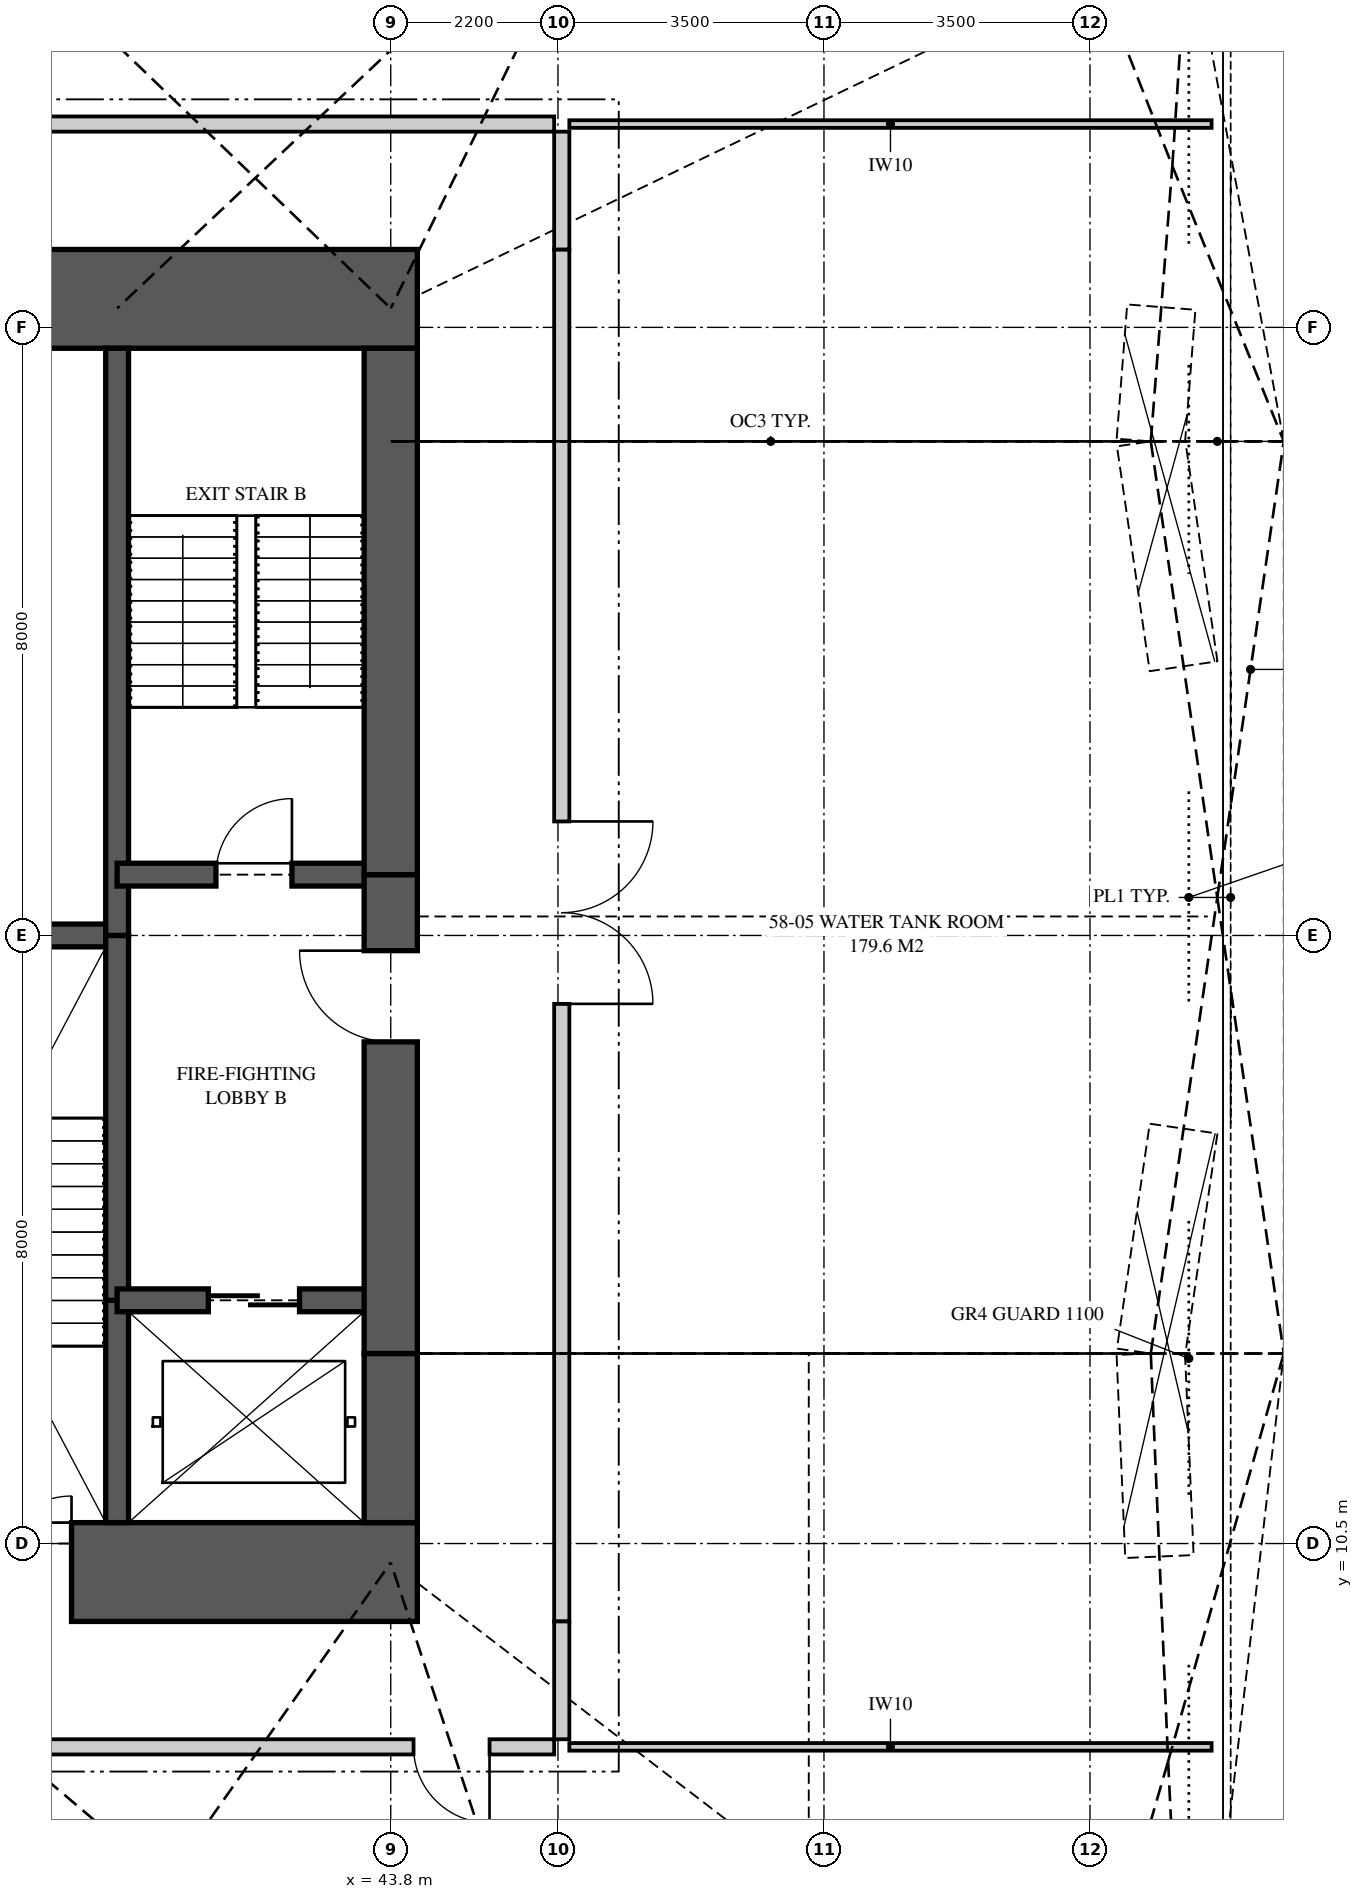
"""IFC4 building model, lengths in metres.
Left out: names, types, materials, properties, quantities, classifications, styles, units other than length and angle.
Written with IfcOpenShell. Run it as: python <this file> out.ifc"""

import sys

from ifc_helpers import new_model, si_unit, direction, frame, frame_2d, origin, place, context, subcontext, project, spatial, polyline, rectangle, outline, extrude, element, fill, save


model = new_model("IFC4")
c1 = context("Model", 3, precision=1e-05, world=origin(), true_north=direction((0.0, 1.0)))
c2 = subcontext(c1, "Body", "Model", "MODEL_VIEW")
j1 = project(units=[si_unit("LENGTHUNIT", "METRE"), si_unit("PLANEANGLEUNIT", "RADIAN")], contexts=[c1])
p1 = place(None, origin())
s1 = spatial("IfcSite", under=j1, at=p1, CompositionType="ELEMENT")
p2 = place(p1, origin())
s2 = spatial("IfcBuilding", under=s1, at=p2, CompositionType="ELEMENT")
p3 = place(p2, frame((0.0, 0.0, 212.95)))
s3 = spatial("IfcBuildingStorey", under=s2, at=p3, CompositionType="ELEMENT", Elevation=212.95)
p4 = place(p3, frame((35.9, 10.125, 0.0), z_axis=(0.0, 0.0, 1.0), x_axis=(1.0, 0.0, 0.0)))
e1 = element("IfcWall", 1, at=p4, inside=s3, PredefinedType="SHEAR", context=c2, shape_type="SweptSolid", body=[
    extrude(rectangle(XDim=8.25, YDim=1.3, at=frame_2d((4.125, 0.0))), origin(), (0.0, 0.0, 1.0), 5.0),
])
p5 = place(p4, frame((2.7, 0.0, 0.0)))
e2 = element("IfcOpeningElement", 2, at=p5, cuts=e1, PredefinedType="OPENING", context=c2, shape_type="SweptSolid", body=[
    extrude(rectangle(XDim=1.0, YDim=2.1, at=frame_2d((0.5, 1.05))), frame((0.0, 0.66, 0.0), z_axis=(0.0, -1.0, 0.0), x_axis=(1.0, 0.0, 0.0)), (0.0, 0.0, 1.0), 1.32),
])
p6 = place(p3, frame((44.15, 26.875, 0.0), z_axis=(0.0, 0.0, 1.0), x_axis=(-1.0, 0.0, 0.0)))
e3 = element("IfcWall", 3, at=p6, inside=s3, PredefinedType="SHEAR", context=c2, shape_type="SweptSolid", body=[
    extrude(rectangle(XDim=8.25, YDim=1.3, at=frame_2d((4.125, 0.0))), origin(), (0.0, 0.0, 1.0), 5.0),
])
p7 = place(p6, frame((5.65, 0.0, 0.0)))
e4 = element("IfcOpeningElement", 4, at=p7, cuts=e3, PredefinedType="OPENING", context=c2, shape_type="SweptSolid", body=[
    extrude(rectangle(XDim=0.9, YDim=2.1, at=frame_2d((0.45, 1.05))), frame((0.0, 0.66, 0.0), z_axis=(0.0, -1.0, 0.0), x_axis=(1.0, 0.0, 0.0)), (0.0, 0.0, 1.0), 1.32),
])
p8 = place(p3, frame((43.8, 10.775, 0.0), z_axis=(0.0, 0.0, 1.0), x_axis=(0.0, 1.0, 0.0)))
e5 = element("IfcWall", 5, at=p8, inside=s3, PredefinedType="SHEAR", context=c2, shape_type="SweptSolid", body=[
    extrude(rectangle(XDim=2.225, YDim=0.7, at=frame_2d((1.113, 0.0))), origin(), (0.0, 0.0, 1.0), 5.0),
])
p9 = place(p3, frame((43.8, 13.0, 0.0), z_axis=(0.0, 0.0, 1.0), x_axis=(0.0, 1.0, 0.0)))
e6 = element("IfcWall", 6, at=p9, inside=s3, PredefinedType="SHEAR", context=c2, shape_type="SweptSolid", body=[
    extrude(rectangle(XDim=6.3, YDim=0.7, at=frame_2d((3.15, 0.0))), origin(), (0.0, 0.0, 1.0), 5.0),
])
p10 = place(p9, frame((4.1, 0.0, 0.0)))
e7 = element("IfcOpeningElement", 7, at=p10, cuts=e6, PredefinedType="OPENING", context=c2, shape_type="SweptSolid", body=[
    extrude(rectangle(XDim=1.2, YDim=2.2, at=frame_2d((0.6, 1.1))), frame((0.0, 0.36, 0.0), z_axis=(0.0, -1.0, 0.0), x_axis=(1.0, 0.0, 0.0)), (0.0, 0.0, 1.0), 0.72),
])
p11 = place(p3, frame((43.8, 19.3, 0.0), z_axis=(0.0, 0.0, 1.0), x_axis=(0.0, 1.0, 0.0)))
e8 = element("IfcWall", 8, at=p11, inside=s3, PredefinedType="SHEAR", context=c2, shape_type="SweptSolid", body=[
    extrude(rectangle(XDim=6.925, YDim=0.7, at=frame_2d((3.462, 0.0))), origin(), (0.0, 0.0, 1.0), 5.0),
])
p12 = place(p3, frame((40.2, 10.775, 0.0), z_axis=(0.0, 0.0, 1.0), x_axis=(0.0, 1.0, 0.0)))
e9 = element("IfcWall", 9, at=p12, inside=s3, PredefinedType="SHEAR", context=c2, shape_type="SweptSolid", body=[
    extrude(rectangle(XDim=2.925, YDim=0.3, at=frame_2d((1.462, 0.0))), origin(), (0.0, 0.0, 1.0), 5.0),
])
p13 = place(p3, frame((40.2, 13.7, 0.0), z_axis=(0.0, 0.0, 1.0), x_axis=(0.0, 1.0, 0.0)))
e10 = element("IfcWall", 10, at=p13, inside=s3, PredefinedType="SHEAR", context=c2, shape_type="SweptSolid", body=[
    extrude(rectangle(XDim=4.8, YDim=0.3, at=frame_2d((2.4, 0.0))), origin(), (0.0, 0.0, 1.0), 5.0),
])
p14 = place(p3, frame((40.2, 18.5, 0.0), z_axis=(0.0, 0.0, 1.0), x_axis=(0.0, 1.0, 0.0)))
e11 = element("IfcWall", 11, at=p14, inside=s3, PredefinedType="SHEAR", context=c2, shape_type="SweptSolid", body=[
    extrude(rectangle(XDim=7.725, YDim=0.3, at=frame_2d((3.863, 0.0))), origin(), (0.0, 0.0, 1.0), 5.0),
])
p15 = place(p3, frame((35.9, 18.5, 0.0), z_axis=(0.0, 0.0, 1.0), x_axis=(1.0, 0.0, 0.0)))
e12 = element("IfcWall", 12, at=p15, inside=s3, PredefinedType="SHEAR", context=c2, shape_type="SweptSolid", body=[
    extrude(rectangle(XDim=4.3, YDim=0.3, at=frame_2d((2.15, 0.0))), origin(), (0.0, 0.0, 1.0), 5.0),
])
p16 = place(p3, frame((40.2, 13.7, 0.0), z_axis=(0.0, 0.0, 1.0), x_axis=(1.0, 0.0, 0.0)))
e13 = element("IfcWall", 13, at=p16, inside=s3, PredefinedType="SHEAR", context=c2, shape_type="SweptSolid", body=[
    extrude(rectangle(XDim=3.6, YDim=0.3, at=frame_2d((1.8, 0.0))), origin(), (0.0, 0.0, 1.0), 5.0),
])
p17 = place(p16, frame((1.2, 0.0, 0.0)))
e14 = element("IfcOpeningElement", 14, at=p17, cuts=e13, PredefinedType="OPENING", context=c2, shape_type="SweptSolid", body=[
    extrude(rectangle(XDim=1.2, YDim=2.1, at=frame_2d((0.6, 1.05))), frame((0.0, 0.16, 0.0), z_axis=(0.0, -1.0, 0.0), x_axis=(1.0, 0.0, 0.0)), (0.0, 0.0, 1.0), 0.32),
])
p18 = place(p3, frame((40.2, 19.3, 0.0), z_axis=(0.0, 0.0, 1.0), x_axis=(1.0, 0.0, 0.0)))
e15 = element("IfcWall", 15, at=p18, inside=s3, PredefinedType="SHEAR", context=c2, shape_type="SweptSolid", body=[
    extrude(rectangle(XDim=3.6, YDim=0.3, at=frame_2d((1.8, 0.0))), origin(), (0.0, 0.0, 1.0), 5.0),
])
p19 = place(p18, frame((1.3, 0.0, 0.0)))
e16 = element("IfcOpeningElement", 16, at=p19, cuts=e15, PredefinedType="OPENING", context=c2, shape_type="SweptSolid", body=[
    extrude(rectangle(XDim=1.0, YDim=2.1, at=frame_2d((0.5, 1.05))), frame((0.0, 0.16, 0.0), z_axis=(0.0, -1.0, 0.0), x_axis=(1.0, 0.0, 0.0)), (0.0, 0.0, 1.0), 0.32),
])
p20 = place(p3, frame((17.85, 7.825, 0.0), z_axis=(0.0, 0.0, 1.0), x_axis=(1.0, 0.0, 0.0)))
e17 = element("IfcWall", 17, at=p20, inside=s3, PredefinedType="PARTITIONING", context=c2, shape_type="SweptSolid", body=[
    extrude(outline(polyline([(0.122, 1.271), (0.0, 1.25), (0.0, 0.0), (28.1, 0.0), (28.1, 4.72), (27.034, 4.72), (27.034, 4.141), (26.47, 4.141), (26.47, 4.72), (24.601, 4.72), (24.601, 4.141), (23.883, 4.141), (23.883, 4.72), (21.395, 4.72), (21.395, 4.141), (20.428, 4.141), (20.428, 4.72), (19.656, 4.72), (19.656, 4.245), (19.144, 4.245), (19.144, 4.72), (16.297, 4.72), (16.297, 4.141), (15.487, 4.141), (15.487, 4.72), (13.421, 4.72), (13.421, 4.141), (12.59, 4.141), (12.59, 4.72), (8.665, 4.72), (8.665, 4.141), (7.774, 4.141), (7.774, 4.72), (4.526, 4.72), (4.526, 4.141), (3.751, 4.141), (3.751, 4.72), (2.715, 4.72), (2.715, 3.52), (2.217, 3.52), (2.217, 3.5), (0.0, 3.5), (0.0, 2.283), (0.179, 2.283), (0.179, 2.258), (0.22, 2.258), (0.22, 1.377), (0.205, 1.363), (0.179, 1.334), (0.174, 1.292), (0.14, 1.291), (0.122, 1.271)]), holes=[polyline([(18.5, 3.316), (18.554, 3.43), (19.061, 3.496), (19.061, 3.004), (19.007, 2.889), (18.5, 2.824), (18.5, 3.316)])]), frame((0.0, 0.1, 0.0), z_axis=(0.0, -1.0, 0.0), x_axis=(1.0, 0.0, 0.0)), (0.0, 0.0, 1.0), 0.2),
])
p21 = place(p20, frame((0.85, 0.0, 0.0)))
e18 = element("IfcOpeningElement", 18, at=p21, cuts=e17, PredefinedType="OPENING", context=c2, shape_type="SweptSolid", body=[
    extrude(rectangle(XDim=1.0, YDim=2.1, at=frame_2d((0.5, 1.05))), frame((0.0, 0.11, 0.0), z_axis=(0.0, -1.0, 0.0), x_axis=(1.0, 0.0, 0.0)), (0.0, 0.0, 1.0), 0.22),
])
p22 = place(p20, frame((26.25, 0.0, 0.0)))
e19 = element("IfcOpeningElement", 19, at=p22, cuts=e17, PredefinedType="OPENING", context=c2, shape_type="SweptSolid", body=[
    extrude(rectangle(XDim=1.0, YDim=2.1, at=frame_2d((0.5, 1.05))), frame((0.0, 0.11, 0.0), z_axis=(0.0, -1.0, 0.0), x_axis=(1.0, 0.0, 0.0)), (0.0, 0.0, 1.0), 0.22),
])
p23 = place(p3, frame((46.05, 7.925, 0.0), z_axis=(0.0, 0.0, 1.0), x_axis=(0.0, 1.0, 0.0)))
e20 = element("IfcWall", 20, at=p23, inside=s3, PredefinedType="PARTITIONING", context=c2, shape_type="SweptSolid", body=[
    extrude(outline(polyline([(0.0, 0.0), (1.55, 0.0), (1.55, 4.72), (1.307, 4.72), (1.307, 3.52), (0.0, 3.52), (0.0, 0.0)])), frame((0.0, 0.1, 0.0), z_axis=(0.0, -1.0, 0.0), x_axis=(1.0, 0.0, 0.0)), (0.0, 0.0, 1.0), 0.2),
])
p24 = place(p3, frame((17.85, 29.175, 0.0), z_axis=(0.0, 0.0, 1.0), x_axis=(1.0, 0.0, 0.0)))
e21 = element("IfcWall", 21, at=p24, inside=s3, PredefinedType="PARTITIONING", context=c2, shape_type="SweptSolid", body=[
    extrude(outline(polyline([(0.23, 4.72), (0.0, 4.72), (0.0, 0.0), (28.1, 0.0), (28.1, 4.72), (27.445, 4.72), (27.445, 4.141), (26.822, 4.141), (26.822, 4.72), (25.369, 4.72), (25.369, 4.141), (24.469, 4.141), (24.469, 4.72), (23.874, 4.72), (23.874, 4.141), (22.984, 4.141), (22.984, 4.72), (19.656, 4.72), (19.656, 4.245), (19.144, 4.245), (19.144, 4.72), (16.332, 4.72), (16.332, 4.141), (15.518, 4.141), (15.518, 4.72), (15.386, 4.72), (15.386, 4.141), (14.344, 4.141), (14.344, 4.72), (5.839, 4.72), (5.839, 4.141), (4.593, 4.141), (4.593, 4.72), (2.754, 4.72), (2.754, 3.52), (2.591, 3.52), (2.591, 3.5), (1.302, 3.5), (1.302, 3.046), (1.221, 2.809), (0.343, 2.463), (0.343, 3.5), (0.23, 3.5), (0.23, 4.72)]), holes=[polyline([(18.387, 3.083), (18.903, 3.187), (18.903, 2.666), (18.835, 2.522), (18.319, 2.418), (18.319, 2.939), (18.387, 3.083)])]), frame((0.0, 0.1, 0.0), z_axis=(0.0, -1.0, 0.0), x_axis=(1.0, 0.0, 0.0)), (0.0, 0.0, 1.0), 0.2),
])
p25 = place(p24, frame((13.15, 0.0, 0.0)))
e22 = element("IfcOpeningElement", 22, at=p25, cuts=e21, PredefinedType="OPENING", context=c2, shape_type="SweptSolid", body=[
    extrude(rectangle(XDim=2.4, YDim=2.4, at=frame_2d((1.2, 1.2))), frame((0.0, 0.11, 0.0), z_axis=(0.0, -1.0, 0.0), x_axis=(1.0, 0.0, 0.0)), (0.0, 0.0, 1.0), 0.22),
])
p26 = place(p3, frame((46.05, 27.525, 0.0), z_axis=(0.0, 0.0, 1.0), x_axis=(0.0, 1.0, 0.0)))
e23 = element("IfcWall", 23, at=p26, inside=s3, PredefinedType="PARTITIONING", context=c2, shape_type="SweptSolid", body=[
    extrude(outline(polyline([(0.0, 0.0), (1.55, 0.0), (1.55, 4.72), (0.909, 4.72), (0.909, 3.52), (0.0, 3.52), (0.0, 0.0)])), frame((0.0, 0.1, 0.0), z_axis=(0.0, -1.0, 0.0), x_axis=(1.0, 0.0, 0.0)), (0.0, 0.0, 1.0), 0.2),
])
p27 = place(p3, frame((46.05, 9.475, 0.0), z_axis=(0.0, 0.0, 1.0), x_axis=(0.0, 1.0, 0.0)))
e24 = element("IfcWall", 24, at=p27, inside=s3, PredefinedType="PARTITIONING", context=c2, shape_type="SweptSolid", body=[
    extrude(outline(polyline([(3.313, 4.72), (0.0, 4.72), (0.0, 0.0), (18.05, 0.0), (18.05, 3.52), (17.753, 3.52), (17.753, 4.72), (15.737, 4.72), (15.737, 4.245), (15.313, 4.245), (15.313, 4.72), (9.985, 4.72), (9.985, 4.12), (8.565, 4.12), (8.565, 4.72), (3.737, 4.72), (3.737, 4.245), (3.313, 4.245), (3.313, 4.72)]), holes=[polyline([(3.303, 3.032), (3.303, 3.683), (3.747, 3.683), (3.747, 3.032), (3.303, 3.032)]), polyline([(15.303, 3.032), (15.303, 3.683), (15.747, 3.683), (15.747, 3.032), (15.303, 3.032)])]), frame((0.0, 0.1, 0.0), z_axis=(0.0, -1.0, 0.0), x_axis=(1.0, 0.0, 0.0)), (0.0, 0.0, 1.0), 0.2),
])
p28 = place(p27, frame((8.125, 0.0, 0.0)))
e25 = element("IfcOpeningElement", 25, at=p28, cuts=e24, PredefinedType="OPENING", context=c2, shape_type="SweptSolid", body=[
    extrude(rectangle(XDim=2.4, YDim=2.4, at=frame_2d((1.2, 1.2))), frame((0.0, 0.11, 0.0), z_axis=(0.0, -1.0, 0.0), x_axis=(1.0, 0.0, 0.0)), (0.0, 0.0, 1.0), 0.22),
])
p29 = place(p3, frame((46.15, 7.825, 0.0), z_axis=(0.0, 0.0, 1.0), x_axis=(1.0, 0.0, 0.0)))
e26 = element("IfcWall", 26, at=p29, inside=s3, PredefinedType="PARTITIONING", context=c2, shape_type="SweptSolid", body=[
    extrude(outline(polyline([(1.701, 3.52), (0.0, 3.52), (0.0, 0.0), (8.45, 0.0), (8.45, 1.368), (8.282, 1.368), (8.282, 1.244), (8.277, 1.188), (7.457, 1.172), (7.457, 2.065), (7.46, 2.098), (7.46, 2.106), (7.461, 2.119), (7.492, 2.12), (7.492, 2.199), (7.524, 2.252), (8.372, 2.356), (8.45, 2.356), (8.45, 3.5), (7.73, 3.5), (7.73, 4.72), (4.41, 4.72), (4.41, 4.12), (1.89, 4.12), (1.89, 4.72), (1.701, 4.72), (1.701, 3.52)])), frame((0.0, 0.05, 0.0), z_axis=(0.0, -1.0, 0.0), x_axis=(1.0, 0.0, 0.0)), (0.0, 0.0, 1.0), 0.1),
])
p30 = place(p3, frame((46.15, 29.175, 0.0), z_axis=(0.0, 0.0, 1.0), x_axis=(1.0, 0.0, 0.0)))
e27 = element("IfcWall", 27, at=p30, inside=s3, PredefinedType="PARTITIONING", context=c2, shape_type="SweptSolid", body=[
    extrude(outline(polyline([(1.438, 4.72), (0.0, 4.72), (0.0, 0.0), (8.45, 0.0), (8.45, 1.751), (8.176, 1.751), (8.176, 1.208), (8.133, 1.137), (7.257, 0.944), (7.257, 1.894), (7.3, 1.964), (7.556, 2.021), (7.556, 2.756), (7.563, 2.839), (8.384, 2.879), (8.45, 2.879), (8.45, 3.5), (7.549, 3.5), (7.549, 4.72), (3.954, 4.72), (3.954, 3.52), (1.438, 3.52), (1.438, 4.72)])), frame((0.0, 0.05, 0.0), z_axis=(0.0, -1.0, 0.0), x_axis=(1.0, 0.0, 0.0)), (0.0, 0.0, 1.0), 0.1),
])
p31 = place(p22, frame((1.0, 0.0, 0.0), z_axis=(0.0, 0.0, 1.0), x_axis=(-1.0, 0.0, 0.0)))
e28 = element("IfcDoor", 28, at=p31, inside=s3, OperationType="SINGLE_SWING_LEFT", PredefinedType="DOOR", context=c2, shape_type="SweptSolid", body=[
    extrude(rectangle(XDim=1.0, YDim=2.1, at=frame_2d((0.5, 1.05))), frame((0.0, 0.025, 0.0), z_axis=(0.0, -1.0, 0.0), x_axis=(1.0, 0.0, 0.0)), (0.0, 0.0, 1.0), 0.05),
])
fill(e19, e28)
p32 = place(p28, frame((2.4, 0.0, 0.0), z_axis=(0.0, 0.0, 1.0), x_axis=(-1.0, 0.0, 0.0)))
e29 = element("IfcDoor", 29, at=p32, inside=s3, OperationType="DOUBLE_DOOR_SINGLE_SWING", PredefinedType="DOOR", context=c2, shape_type="SweptSolid", body=[
    extrude(rectangle(XDim=2.4, YDim=2.4, at=frame_2d((1.2, 1.2))), frame((0.0, 0.025, 0.0), z_axis=(0.0, -1.0, 0.0), x_axis=(1.0, 0.0, 0.0)), (0.0, 0.0, 1.0), 0.05),
])
fill(e25, e29)
p33 = place(p19, origin())
e30 = element("IfcDoor", 30, at=p33, inside=s3, OperationType="SINGLE_SWING_RIGHT", PredefinedType="DOOR", context=c2, shape_type="SweptSolid", body=[
    extrude(rectangle(XDim=1.0, YDim=2.1, at=frame_2d((0.5, 1.05))), frame((0.0, 0.025, 0.0), z_axis=(0.0, -1.0, 0.0), x_axis=(1.0, 0.0, 0.0)), (0.0, 0.0, 1.0), 0.05),
])
fill(e16, e30)
p34 = place(p10, origin())
e31 = element("IfcDoor", 31, at=p34, inside=s3, OperationType="SINGLE_SWING_RIGHT", PredefinedType="DOOR", context=c2, shape_type="SweptSolid", body=[
    extrude(rectangle(XDim=1.2, YDim=2.2, at=frame_2d((0.6, 1.1))), frame((0.0, 0.025, 0.0), z_axis=(0.0, -1.0, 0.0), x_axis=(1.0, 0.0, 0.0)), (0.0, 0.0, 1.0), 0.05),
])
fill(e7, e31)
p35 = place(p17, origin())
e32 = element("IfcDoor", 32, at=p35, inside=s3, OperationType="SLIDING_TO_LEFT", PredefinedType="DOOR", context=c2, shape_type="SweptSolid", body=[
    extrude(rectangle(XDim=1.2, YDim=2.1, at=frame_2d((0.6, 1.05))), frame((0.0, 0.025, 0.0), z_axis=(0.0, -1.0, 0.0), x_axis=(1.0, 0.0, 0.0)), (0.0, 0.0, 1.0), 0.05),
])
fill(e14, e32)
p36 = place(p5, origin())
e33 = element("IfcDoor", 33, at=p36, inside=s3, OperationType="SINGLE_SWING_RIGHT", PredefinedType="DOOR", context=c2, shape_type="SweptSolid", body=[
    extrude(rectangle(XDim=1.0, YDim=2.1, at=frame_2d((0.5, 1.05))), frame((0.0, 0.025, 0.0), z_axis=(0.0, -1.0, 0.0), x_axis=(1.0, 0.0, 0.0)), (0.0, 0.0, 1.0), 0.05),
])
fill(e2, e33)
save(model, sys.argv[1])
